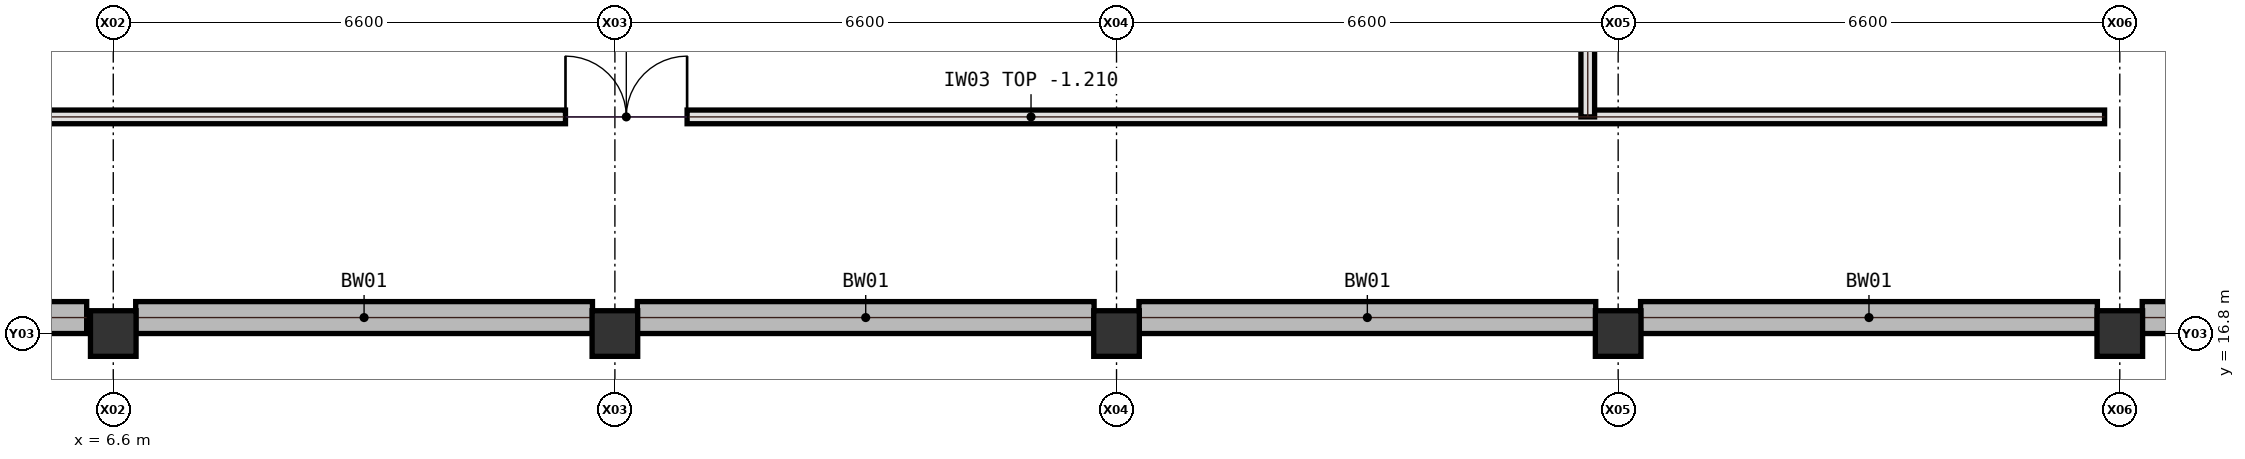
"""IFC4 building model, lengths in metres.
Left out: names, types, materials, properties, quantities, classifications, styles, units other than length and angle.
Written with IfcOpenShell. Run it as: python <this file> out.ifc"""

import sys

from ifc_helpers import new_model, si_unit, direction, frame, frame_2d, origin, origin_2d, place, context, subcontext, project, spatial, rectangle, extrude, element, fill, save


model = new_model("IFC4")
c1 = context("Model", 3, precision=1e-05, world=origin(), true_north=direction((0.0, 1.0)))
c2 = subcontext(c1, "Body", "Model", "MODEL_VIEW")
j1 = project(units=[si_unit("LENGTHUNIT", "METRE"), si_unit("PLANEANGLEUNIT", "RADIAN")], contexts=[c1])
p1 = place(None, origin())
s1 = spatial("IfcSite", under=j1, at=p1, CompositionType="ELEMENT")
p2 = place(p1, origin())
s2 = spatial("IfcBuilding", under=s1, at=p2, CompositionType="ELEMENT")
p3 = place(p2, frame((0.0, 0.0, -4.5)))
s3 = spatial("IfcBuildingStorey", under=s2, at=p3, CompositionType="ELEMENT", Elevation=-4.5)
for number, where, z_axis, x_axis in (
    (1, (6.6, 16.8, 0.0), (0.0, 0.0, 1.0), (1.0, 0.0, 0.0)),
    (2, (13.2, 16.8, 0.0), (0.0, 0.0, 1.0), (1.0, 0.0, 0.0)),
    (3, (19.8, 16.8, 0.0), (0.0, 0.0, 1.0), (1.0, 0.0, 0.0)),
    (4, (26.4, 16.8, 0.0), (0.0, 0.0, 1.0), (1.0, 0.0, 0.0)),
    (5, (33.0, 16.8, 0.0), (0.0, 0.0, 1.0), (1.0, 0.0, 0.0)),
):
    element("IfcColumn", number, at=place(p3, frame(where, z_axis=z_axis, x_axis=x_axis)), inside=s3, PredefinedType="COLUMN", context=c2, shape_type="SweptSolid", body=[
        extrude(rectangle(XDim=0.6, YDim=0.6, at=origin_2d()), origin(), (0.0, 0.0, 1.0), 4.5),
    ])
p4 = place(p3, frame((4.55, 19.65, 0.0), z_axis=(0.0, 0.0, 1.0), x_axis=(1.0, 0.0, 0.0)))
e6 = element("IfcWall", 6, at=p4, inside=s3, PredefinedType="SOLIDWALL", context=c2, shape_type="SweptSolid", body=[
    extrude(rectangle(XDim=28.25, YDim=0.18, at=frame_2d((14.125, 0.0))), origin(), (0.0, 0.0, 1.0), 3.29),
])
p5 = place(p4, frame((8.0, 0.0, 0.0)))
e7 = element("IfcOpeningElement", 7, at=p5, cuts=e6, PredefinedType="OPENING", context=c2, shape_type="SweptSolid", body=[
    extrude(rectangle(XDim=1.6, YDim=2.2, at=frame_2d((0.8, 1.1))), frame((0.0, 0.1, 0.0), z_axis=(0.0, -1.0, 0.0), x_axis=(1.0, 0.0, 0.0)), (0.0, 0.0, 1.0), 0.2),
])
p6 = place(p3, frame((26.0, 19.65, 0.0), z_axis=(0.0, 0.0, 1.0), x_axis=(0.0, 1.0, 0.0)))
e8 = element("IfcWall", 8, at=p6, inside=s3, PredefinedType="SOLIDWALL", context=c2, shape_type="SweptSolid", body=[
    extrude(rectangle(XDim=5.1, YDim=0.18, at=frame_2d((2.55, 0.0))), origin(), (0.0, 0.0, 1.0), 3.29),
])
p7 = place(p3, frame((0.35, 17.01, 0.0), z_axis=(0.0, 0.0, 1.0), x_axis=(1.0, 0.0, 0.0)))
e9 = element("IfcWall", 9, at=p7, inside=s3, PredefinedType="SOLIDWALL", context=c2, shape_type="SweptSolid", body=[
    extrude(rectangle(XDim=5.9, YDim=0.42, at=frame_2d((2.95, 0.0))), origin(), (0.0, 0.0, 1.0), 4.14),
])
p8 = place(p3, frame((6.895, 17.01, 0.0), z_axis=(0.0, 0.0, 1.0), x_axis=(1.0, 0.0, 0.0)))
e10 = element("IfcWall", 10, at=p8, inside=s3, PredefinedType="SOLIDWALL", context=c2, shape_type="SweptSolid", body=[
    extrude(rectangle(XDim=6.01, YDim=0.42, at=frame_2d((3.005, 0.0))), origin(), (0.0, 0.0, 1.0), 4.14),
])
p9 = place(p3, frame((13.495, 17.01, 0.0), z_axis=(0.0, 0.0, 1.0), x_axis=(1.0, 0.0, 0.0)))
e11 = element("IfcWall", 11, at=p9, inside=s3, PredefinedType="SOLIDWALL", context=c2, shape_type="SweptSolid", body=[
    extrude(rectangle(XDim=6.01, YDim=0.42, at=frame_2d((3.005, 0.0))), origin(), (0.0, 0.0, 1.0), 4.14),
])
for number, where, z_axis, x_axis in (
    (12, (20.095, 17.01, 0.0), (0.0, 0.0, 1.0), (1.0, 0.0, 0.0)),
    (13, (26.695, 17.01, 0.0), (0.0, 0.0, 1.0), (1.0, 0.0, 0.0)),
    (14, (33.295, 17.01, 0.0), (0.0, 0.0, 1.0), (1.0, 0.0, 0.0)),
):
    element("IfcWall", number, at=place(p3, frame(where, z_axis=z_axis, x_axis=x_axis)), inside=s3, PredefinedType="SOLIDWALL", context=c2, shape_type="SweptSolid", body=[
        extrude(rectangle(XDim=6.01, YDim=0.42, at=frame_2d((3.005, 0.0))), origin(), (0.0, 0.0, 1.0), 4.14),
    ])
p10 = place(p5, origin())
e15 = element("IfcDoor", 15, at=p10, inside=s3, OperationType="DOUBLE_DOOR_SINGLE_SWING", PredefinedType="DOOR", context=c2, shape_type="SweptSolid", body=[
    extrude(rectangle(XDim=1.6, YDim=2.2, at=frame_2d((0.8, 1.1))), frame((0.0, 0.025, 0.0), z_axis=(0.0, -1.0, 0.0), x_axis=(1.0, 0.0, 0.0)), (0.0, 0.0, 1.0), 0.05),
])
fill(e7, e15)
save(model, sys.argv[1])
